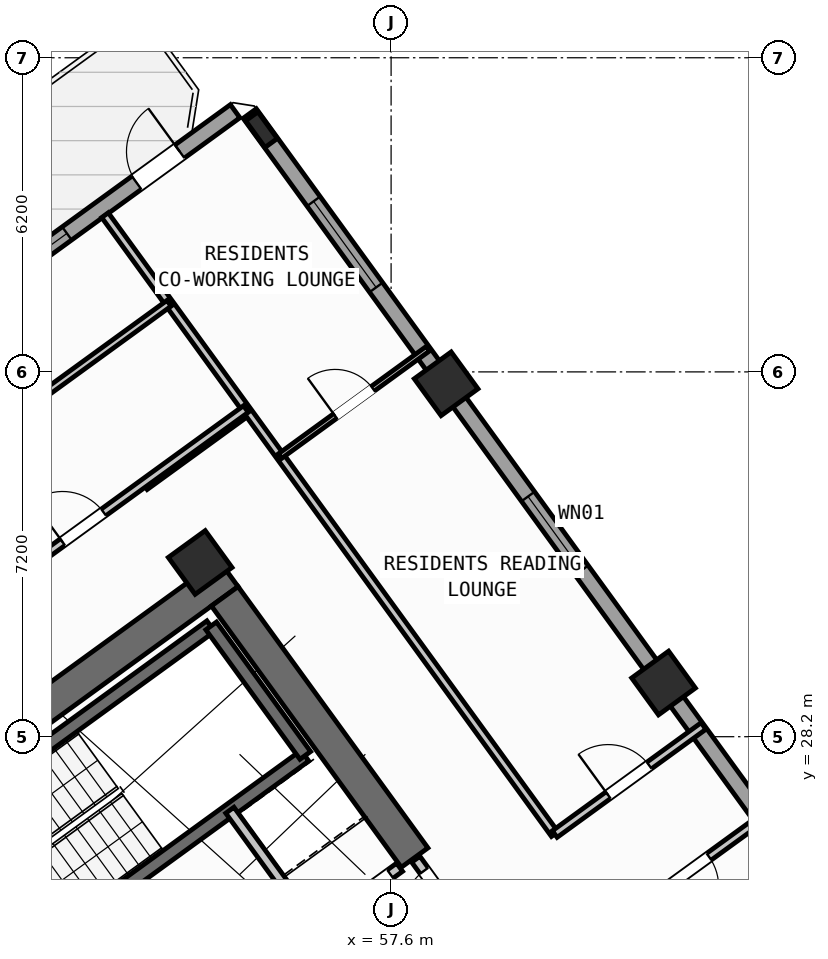
"""IFC4 building model, lengths in metres.
Left out: names, types, materials, properties, quantities, classifications, styles, units other than length and angle.
Written with IfcOpenShell. Run it as: python <this file> out.ifc"""

import sys

from ifc_helpers import new_model, si_unit, direction, frame, frame_2d, origin, origin_2d, place, context, subcontext, project, spatial, rectangle, hollow_rectangle, i_section, extrude, source, transform, mapped, element, fill, save


model = new_model("IFC4")
c1 = context("Model", 3, precision=1e-05, world=origin(), true_north=direction((0.0, 1.0)))
c2 = subcontext(c1, "Body", "Model", "MODEL_VIEW")
j1 = project(units=[si_unit("LENGTHUNIT", "METRE"), si_unit("PLANEANGLEUNIT", "RADIAN")], contexts=[c1])
p1 = place(None, origin())
s1 = spatial("IfcSite", under=j1, at=p1, CompositionType="ELEMENT")
p2 = place(p1, origin())
s2 = spatial("IfcBuilding", under=s1, at=p2, CompositionType="ELEMENT")
p3 = place(p2, frame((0.0, 0.0, 97.2)))
s3 = spatial("IfcBuildingStorey", under=s2, at=p3, CompositionType="ELEMENT", Elevation=97.2)
p4 = place(p3, frame((44.325, 24.113, 0.0), z_axis=(0.0, 0.0, 1.0), x_axis=(0.809012664862, 0.58779121131, 0.0)))
e1 = element("IfcWall", 1, at=p4, inside=s3, PredefinedType="SHEAR", context=c2, shape_type="SweptSolid", body=[
    extrude(rectangle(XDim=12.44, YDim=0.65, at=frame_2d((6.22, 0.0))), origin(), (0.0, 0.0, 1.0), 3.32),
])
p5 = place(p3, frame((58.064, 25.813, 0.0), z_axis=(0.0, 0.0, 1.0), x_axis=(-0.58777996584, 0.809020835181, 0.0)))
e2 = element("IfcWall", 2, at=p5, inside=s3, PredefinedType="SHEAR", context=c2, shape_type="SweptSolid", body=[
    extrude(rectangle(XDim=6.375, YDim=0.65, at=frame_2d((3.188, 0.0))), origin(), (0.0, 0.0, 1.0), 3.32),
])
m1 = source(origin(), c2, "Body", "SweptSolid", [
    extrude(hollow_rectangle(XDim=0.9, YDim=0.9, WallThickness=0.036, at=origin_2d()), origin(), (0.0, 0.0, 1.0), 3.6),
])
for number, where, z_axis, x_axis in (
    (3, (53.832, 31.638, 0.0), (0.0, 0.0, 1.0), (0.809, 0.588, 0.0)),
    (4, (62.977, 29.259, 0.0), (0.0, 0.0, 1.0), (0.809, 0.588, 0.0)),
    (5, (58.686, 35.165, 0.0), (0.0, 0.0, 1.0), (0.809, 0.588, 0.0)),
):
    element("IfcColumn", number, at=place(p3, frame(where, z_axis=z_axis, x_axis=x_axis)), inside=s3, PredefinedType="COLUMN", context=c2, shape_type="MappedRepresentation", body=[
        mapped(m1, transform((0.0, 0.0, 0.0), scale=1.0)),
    ])
m2 = source(origin(), c2, "Body", "SweptSolid", [
    extrude(i_section(OverallWidth=0.3, OverallDepth=0.65, WebThickness=0.016, FlangeThickness=0.031, at=origin_2d()), origin(), (0.0, 0.0, 1.0), 3.6),
])
p6 = place(p3, frame((55.042, 40.181, 0.0), z_axis=(0.0, 0.0, 1.0), x_axis=(0.809016994375, 0.587785252292, 0.0)))
e6 = element("IfcColumn", 6, at=p6, inside=s3, PredefinedType="COLUMN", context=c2, shape_type="MappedRepresentation", body=[
    mapped(m2, transform((0.0, 0.0, 0.0), scale=1.0)),
])
p7 = place(p3, frame((42.207, 31.597, 0.0), z_axis=(0.0, 0.0, 1.0), x_axis=(0.809020333377, 0.587780656523, 0.0)))
e7 = element("IfcWall", 7, at=p7, inside=s3, PredefinedType="STANDARD", context=c2, shape_type="SweptSolid", body=[
    extrude(rectangle(XDim=15.223, YDim=0.32, at=frame_2d((7.611, 0.0))), origin(), (0.0, 0.0, 1.0), 3.32),
])
p8 = place(p7, frame((12.82, 0.0, 0.0)))
e8 = element("IfcOpeningElement", 8, at=p8, cuts=e7, PredefinedType="OPENING", context=c2, shape_type="SweptSolid", body=[
    extrude(rectangle(XDim=1.05, YDim=2.15, at=frame_2d((0.525, 1.075))), frame((0.0, 0.17, 0.0), z_axis=(0.0, -1.0, 0.0), x_axis=(1.0, 0.0, 0.0)), (0.0, 0.0, 1.0), 0.34),
])
p9 = place(p7, frame((1.52, 0.0, 0.8)))
e9 = element("IfcOpeningElement", 9, at=p9, cuts=e7, PredefinedType="OPENING", context=c2, shape_type="SweptSolid", body=[
    extrude(rectangle(XDim=2.1, YDim=1.55, at=frame_2d((1.05, 0.775))), frame((0.0, 0.17, 0.0), z_axis=(0.0, -1.0, 0.0), x_axis=(1.0, 0.0, 0.0)), (0.0, 0.0, 1.0), 0.34),
])
p10 = place(p7, frame((5.76, 0.0, 0.8)))
e10 = element("IfcOpeningElement", 10, at=p10, cuts=e7, PredefinedType="OPENING", context=c2, shape_type="SweptSolid", body=[
    extrude(rectangle(XDim=2.1, YDim=1.55, at=frame_2d((1.05, 0.775))), frame((0.0, 0.17, 0.0), z_axis=(0.0, -1.0, 0.0), x_axis=(1.0, 0.0, 0.0)), (0.0, 0.0, 1.0), 0.34),
])
p11 = place(p7, frame((10.219, 0.0, 1.0)))
e11 = element("IfcOpeningElement", 11, at=p11, cuts=e7, PredefinedType="OPENING", context=c2, shape_type="SweptSolid", body=[
    extrude(rectangle(XDim=0.9, YDim=1.25, at=frame_2d((0.45, 0.625))), frame((0.0, 0.17, 0.0), z_axis=(0.0, -1.0, 0.0), x_axis=(1.0, 0.0, 0.0)), (0.0, 0.0, 1.0), 0.34),
])
p12 = place(p3, frame((54.81, 40.5, 0.0), z_axis=(0.0, 0.0, 1.0), x_axis=(0.587783625747, -0.809018176127, 0.0)))
e12 = element("IfcWall", 12, at=p12, inside=s3, PredefinedType="STANDARD", context=c2, shape_type="SweptSolid", body=[
    extrude(rectangle(XDim=21.587, YDim=0.32, at=frame_2d((10.794, 0.0))), origin(), (0.0, 0.0, 1.0), 2.745),
])
p13 = place(p12, frame((2.143, 0.0, 0.8)))
e13 = element("IfcOpeningElement", 13, at=p13, cuts=e12, PredefinedType="OPENING", context=c2, shape_type="SweptSolid", body=[
    extrude(rectangle(XDim=2.1, YDim=1.55, at=frame_2d((1.05, 0.775))), frame((0.0, 0.17, 0.0), z_axis=(0.0, -1.0, 0.0), x_axis=(1.0, 0.0, 0.0)), (0.0, 0.0, 1.0), 0.34),
])
p14 = place(p12, frame((9.344, 0.0, 0.85)))
e14 = element("IfcOpeningElement", 14, at=p14, cuts=e12, PredefinedType="OPENING", context=c2, shape_type="SweptSolid", body=[
    extrude(rectangle(XDim=1.8, YDim=1.5, at=frame_2d((0.9, 0.75))), frame((0.0, 0.17, 0.0), z_axis=(0.0, -1.0, 0.0), x_axis=(1.0, 0.0, 0.0)), (0.0, 0.0, 1.0), 0.34),
])
p15 = place(p12, frame((18.309, 0.0, 0.85)))
e15 = element("IfcOpeningElement", 15, at=p15, cuts=e12, PredefinedType="OPENING", context=c2, shape_type="SweptSolid", body=[
    extrude(rectangle(XDim=1.5, YDim=1.5, at=frame_2d((0.75, 0.75))), frame((0.0, 0.17, 0.0), z_axis=(0.0, -1.0, 0.0), x_axis=(1.0, 0.0, 0.0)), (0.0, 0.0, 1.0), 0.34),
])
p16 = place(p3, frame((48.006, 25.996, 0.0), z_axis=(0.0, 0.0, 1.0), x_axis=(0.80901903764, 0.587782439969, 0.0)))
e16 = element("IfcWall", 16, at=p16, inside=s3, PredefinedType="SHEAR", context=c2, shape_type="SweptSolid", body=[
    extrude(rectangle(XDim=7.46, YDim=0.26, at=frame_2d((3.73, 0.0))), origin(), (0.0, 0.0, 1.0), 3.32),
])
p17 = place(p3, frame((49.863, 23.44, 0.0), z_axis=(0.0, 0.0, 1.0), x_axis=(0.809003474932, 0.587803859759, 0.0)))
e17 = element("IfcWall", 17, at=p17, inside=s3, PredefinedType="SHEAR", context=c2, shape_type="SweptSolid", body=[
    extrude(rectangle(XDim=7.46, YDim=0.26, at=frame_2d((3.73, 0.0))), origin(), (0.0, 0.0, 1.0), 3.32),
])
p18 = place(p17, frame((0.36, 0.0, 0.0)))
e18 = element("IfcOpeningElement", 18, at=p18, cuts=e17, PredefinedType="OPENING", context=c2, shape_type="SweptSolid", body=[
    extrude(rectangle(XDim=0.86, YDim=2.05, at=frame_2d((0.43, 1.025))), frame((0.0, 0.14, 0.0), z_axis=(0.0, -1.0, 0.0), x_axis=(1.0, 0.0, 0.0)), (0.0, 0.0, 1.0), 0.28),
])
p19 = place(p3, frame((55.906, 27.831, 0.0), z_axis=(0.0, 0.0, 1.0), x_axis=(-0.587804123638, 0.809003283204, 0.0)))
e19 = element("IfcWall", 19, at=p19, inside=s3, PredefinedType="SHEAR", context=c2, shape_type="SweptSolid", body=[
    extrude(rectangle(XDim=3.16, YDim=0.26, at=frame_2d((1.58, 0.0))), origin(), (0.0, 0.0, 1.0), 3.32),
])
p20 = place(p3, frame((56.111, 24.419, 0.0), z_axis=(0.0, 0.0, 1.0), x_axis=(-0.58777848983, 0.809021907548, 0.0)))
e20 = element("IfcWall", 20, at=p20, inside=s3, PredefinedType="STANDARD", context=c2, shape_type="SweptSolid", body=[
    extrude(rectangle(XDim=2.88, YDim=0.2, at=frame_2d((1.44, 0.0))), origin(), (0.0, 0.0, 1.0), 3.31),
])
p21 = place(p3, frame((53.425, 22.468, 0.0), z_axis=(0.0, 0.0, 1.0), x_axis=(0.80902705128, 0.587771409902, 0.0)))
e21 = element("IfcWall", 21, at=p21, inside=s3, PredefinedType="STANDARD", context=c2, shape_type="SweptSolid", body=[
    extrude(rectangle(XDim=5.368, YDim=0.2, at=frame_2d((2.684, 0.0))), origin(), (0.0, 0.0, 1.0), 3.31),
])
p22 = place(p21, frame((4.28, 0.0, 0.0)))
e22 = element("IfcOpeningElement", 22, at=p22, cuts=e21, PredefinedType="OPENING", context=c2, shape_type="SweptSolid", body=[
    extrude(rectangle(XDim=0.86, YDim=2.05, at=frame_2d((0.43, 1.025))), frame((0.0, 0.11, 0.0), z_axis=(0.0, -1.0, 0.0), x_axis=(1.0, 0.0, 0.0)), (0.0, 0.0, 1.0), 0.22),
])
p23 = place(p21, frame((1.45, 0.0, 0.0)))
e23 = element("IfcOpeningElement", 23, at=p23, cuts=e21, PredefinedType="OPENING", context=c2, shape_type="SweptSolid", body=[
    extrude(rectangle(XDim=0.86, YDim=2.05, at=frame_2d((0.43, 1.025))), frame((0.0, 0.11, 0.0), z_axis=(0.0, -1.0, 0.0), x_axis=(1.0, 0.0, 0.0)), (0.0, 0.0, 1.0), 0.22),
])
p24 = place(p3, frame((59.827, 23.386, 0.0), z_axis=(0.0, 0.0, 1.0), x_axis=(-0.587803840107, 0.809003489211, 0.0)))
e24 = element("IfcWall", 24, at=p24, inside=s3, PredefinedType="STANDARD", context=c2, shape_type="SweptSolid", body=[
    extrude(rectangle(XDim=2.96, YDim=0.2, at=frame_2d((1.48, 0.0))), origin(), (0.0, 0.0, 1.0), 3.31),
])
p25 = place(p24, frame((1.68, 0.0, 0.0)))
e25 = element("IfcOpeningElement", 25, at=p25, cuts=e24, PredefinedType="OPENING", context=c2, shape_type="SweptSolid", body=[
    extrude(rectangle(XDim=1.0, YDim=2.1, at=frame_2d((0.5, 1.05))), frame((0.0, 0.11, 0.0), z_axis=(0.0, -1.0, 0.0), x_axis=(1.0, 0.0, 0.0)), (0.0, 0.0, 1.0), 0.22),
])
p26 = place(p3, frame((52.739, 33.143, 0.0), z_axis=(0.0, 0.0, 1.0), x_axis=(0.809000999347, 0.58780726693, 0.0)))
e26 = element("IfcWall", 26, at=p26, inside=s3, PredefinedType="PARTITIONING", context=c2, shape_type="SweptSolid", body=[
    extrude(rectangle(XDim=2.51, YDim=0.16, at=frame_2d((1.255, 0.0))), origin(), (0.0, 0.0, 1.0), 3.31),
])
p27 = place(p3, frame((60.829, 26.278, 0.0), z_axis=(0.0, 0.0, 1.0), x_axis=(-0.587777474174, 0.809022645451, 0.0)))
e27 = element("IfcWall", 27, at=p27, inside=s3, PredefinedType="PARTITIONING", context=c2, shape_type="SweptSolid", body=[
    extrude(rectangle(XDim=15.1, YDim=0.16, at=frame_2d((7.55, 0.0))), origin(), (0.0, 0.0, 1.0), 3.31),
])
p28 = place(p3, frame((62.093, 24.538, 0.0), z_axis=(0.0, 0.0, 1.0), x_axis=(0.809035546126, 0.58775971715, 0.0)))
e28 = element("IfcWall", 28, at=p28, inside=s3, PredefinedType="PARTITIONING", context=c2, shape_type="SweptSolid", body=[
    extrude(rectangle(XDim=3.63, YDim=0.16, at=frame_2d((1.815, 0.0))), origin(), (0.0, 0.0, 1.0), 3.31),
])
p29 = place(p28, frame((1.2, 0.0, 0.0)))
e29 = element("IfcOpeningElement", 29, at=p29, cuts=e28, PredefinedType="OPENING", context=c2, shape_type="SweptSolid", body=[
    extrude(rectangle(XDim=1.0, YDim=2.1, at=frame_2d((0.5, 1.05))), frame((0.0, 0.09, 0.0), z_axis=(0.0, -1.0, 0.0), x_axis=(1.0, 0.0, 0.0)), (0.0, 0.0, 1.0), 0.18),
])
p30 = place(p3, frame((60.829, 26.278, 0.0), z_axis=(0.0, 0.0, 1.0), x_axis=(0.809003564202, 0.587803736896, 0.0)))
e30 = element("IfcWall", 30, at=p30, inside=s3, PredefinedType="PARTITIONING", context=c2, shape_type="SweptSolid", body=[
    extrude(rectangle(XDim=3.63, YDim=0.16, at=frame_2d((1.815, 0.0))), origin(), (0.0, 0.0, 1.0), 3.31),
])
p31 = place(p30, frame((1.305, 0.0, 0.0)))
e31 = element("IfcOpeningElement", 31, at=p31, cuts=e30, PredefinedType="OPENING", context=c2, shape_type="SweptSolid", body=[
    extrude(rectangle(XDim=1.0, YDim=2.1, at=frame_2d((0.5, 1.05))), frame((0.0, 0.09, 0.0), z_axis=(0.0, -1.0, 0.0), x_axis=(1.0, 0.0, 0.0)), (0.0, 0.0, 1.0), 0.18),
])
p32 = place(p3, frame((55.409, 33.738, 0.0), z_axis=(0.0, 0.0, 1.0), x_axis=(0.809005039917, 0.58780170584, 0.0)))
e32 = element("IfcWall", 32, at=p32, inside=s3, PredefinedType="PARTITIONING", context=c2, shape_type="SweptSolid", body=[
    extrude(rectangle(XDim=3.61, YDim=0.11, at=frame_2d((1.805, 0.0))), origin(), (0.0, 0.0, 1.0), 3.31),
])
p33 = place(p32, frame((1.345, 0.0, 0.0)))
e33 = element("IfcOpeningElement", 33, at=p33, cuts=e32, PredefinedType="OPENING", context=c2, shape_type="SweptSolid", body=[
    extrude(rectangle(XDim=0.92, YDim=2.08, at=frame_2d((0.46, 1.04))), frame((0.0, 0.065, 0.0), z_axis=(0.0, -1.0, 0.0), x_axis=(1.0, 0.0, 0.0)), (0.0, 0.0, 1.0), 0.13),
])
p34 = place(p3, frame((42.866, 26.044, 0.0), z_axis=(0.0, 0.0, 1.0), x_axis=(0.809020254154, 0.587780765566, 0.0)))
e34 = element("IfcWall", 34, at=p34, inside=s3, PredefinedType="PARTITIONING", context=c2, shape_type="SweptSolid", body=[
    extrude(rectangle(XDim=14.67, YDim=0.16, at=frame_2d((7.335, 0.0))), origin(), (0.0, 0.0, 1.0), 3.31),
])
p35 = place(p34, frame((10.2, 0.0, 0.0)))
e35 = element("IfcOpeningElement", 35, at=p35, cuts=e34, PredefinedType="OPENING", context=c2, shape_type="SweptSolid", body=[
    extrude(rectangle(XDim=1.0, YDim=2.1, at=frame_2d((0.5, 1.05))), frame((0.0, 0.09, 0.0), z_axis=(0.0, -1.0, 0.0), x_axis=(1.0, 0.0, 0.0)), (0.0, 0.0, 1.0), 0.18),
])
p36 = place(p3, frame((42.377, 28.878, 0.0), z_axis=(0.0, 0.0, 1.0), x_axis=(0.809020411523, 0.587780548963, 0.0)))
e36 = element("IfcWall", 36, at=p36, inside=s3, PredefinedType="PLUMBINGWALL", context=c2, shape_type="SweptSolid", body=[
    extrude(rectangle(XDim=13.4, YDim=0.14, at=frame_2d((6.7, 0.0))), origin(), (0.0, 0.0, 1.0), 3.31),
])
p37 = place(p36, frame((8.94, 0.0, 0.0)))
e37 = element("IfcOpeningElement", 37, at=p37, cuts=e36, PredefinedType="OPENING", context=c2, shape_type="SweptSolid", body=[
    extrude(rectangle(XDim=0.92, YDim=2.08, at=frame_2d((0.46, 1.04))), frame((0.0, 0.08, 0.0), z_axis=(0.0, -1.0, 0.0), x_axis=(1.0, 0.0, 0.0)), (0.0, 0.0, 1.0), 0.16),
])
m3 = source(origin(), c2, "Body", "SweptSolid", [
    extrude(rectangle(XDim=1.05, YDim=2.15, at=frame_2d((0.525, 1.075))), frame((0.0, 0.025, 0.0), z_axis=(0.0, -1.0, 0.0), x_axis=(1.0, 0.0, 0.0)), (0.0, 0.0, 1.0), 0.05),
])
p38 = place(p8, origin())
e38 = element("IfcDoor", 38, at=p38, inside=s3, OperationType="SINGLE_SWING_RIGHT", PredefinedType="DOOR", context=c2, shape_type="MappedRepresentation", body=[
    mapped(m3, transform((0.0, 0.0, 0.0), scale=1.0)),
])
fill(e8, e38)
m4 = source(origin(), c2, "Body", "SweptSolid", [
    extrude(rectangle(XDim=0.9, YDim=1.25, at=frame_2d((0.45, 0.625))), frame((0.0, 0.03, 0.0), z_axis=(0.0, -1.0, 0.0), x_axis=(1.0, 0.0, 0.0)), (0.0, 0.0, 1.0), 0.06),
])
p39 = place(p11, origin())
e39 = element("IfcWindow", 39, at=p39, inside=s3, PartitioningType="SINGLE_PANEL", PredefinedType="WINDOW", context=c2, shape_type="MappedRepresentation", body=[
    mapped(m4, transform((0.0, 0.0, 0.0), scale=1.0)),
])
fill(e11, e39)
m5 = source(origin(), c2, "Body", "SweptSolid", [
    extrude(rectangle(XDim=2.1, YDim=1.55, at=frame_2d((1.05, 0.775))), frame((0.0, 0.03, 0.0), z_axis=(0.0, -1.0, 0.0), x_axis=(1.0, 0.0, 0.0)), (0.0, 0.0, 1.0), 0.06),
])
p40 = place(p13, origin())
e40 = element("IfcWindow", 40, at=p40, inside=s3, PartitioningType="SINGLE_PANEL", PredefinedType="WINDOW", context=c2, shape_type="MappedRepresentation", body=[
    mapped(m5, transform((0.0, 0.0, 0.0), scale=1.0)),
])
fill(e13, e40)
m6 = source(origin(), c2, "Body", "SweptSolid", [
    extrude(rectangle(XDim=1.8, YDim=1.5, at=frame_2d((0.9, 0.75))), frame((0.0, 0.03, 0.0), z_axis=(0.0, -1.0, 0.0), x_axis=(1.0, 0.0, 0.0)), (0.0, 0.0, 1.0), 0.06),
])
p41 = place(p14, origin())
e41 = element("IfcWindow", 41, at=p41, inside=s3, PartitioningType="SINGLE_PANEL", PredefinedType="WINDOW", context=c2, shape_type="MappedRepresentation", body=[
    mapped(m6, transform((0.0, 0.0, 0.0), scale=1.0)),
])
fill(e14, e41)
m7 = source(origin(), c2, "Body", "SweptSolid", [
    extrude(rectangle(XDim=0.86, YDim=2.05, at=frame_2d((0.43, 1.025))), frame((0.0, 0.025, 0.0), z_axis=(0.0, -1.0, 0.0), x_axis=(1.0, 0.0, 0.0)), (0.0, 0.0, 1.0), 0.05),
])
p42 = place(p22, frame((0.86, 0.0, 0.0), z_axis=(0.0, 0.0, 1.0), x_axis=(-1.0, 0.0, 0.0)))
e42 = element("IfcDoor", 42, at=p42, inside=s3, OperationType="SINGLE_SWING_RIGHT", PredefinedType="DOOR", context=c2, shape_type="MappedRepresentation", body=[
    mapped(m7, transform((0.0, 0.0, 0.0), scale=1.0)),
])
fill(e22, e42)
m8 = source(origin(), c2, "Body", "SweptSolid", [
    extrude(rectangle(XDim=1.0, YDim=2.1, at=frame_2d((0.5, 1.05))), frame((0.0, 0.025, 0.0), z_axis=(0.0, -1.0, 0.0), x_axis=(1.0, 0.0, 0.0)), (0.0, 0.0, 1.0), 0.05),
])
p43 = place(p25, origin())
e43 = element("IfcDoor", 43, at=p43, inside=s3, OperationType="SINGLE_SWING_LEFT", PredefinedType="DOOR", context=c2, shape_type="MappedRepresentation", body=[
    mapped(m8, transform((0.0, 0.0, 0.0), scale=1.0)),
])
fill(e25, e43)
p44 = place(p31, origin())
e44 = element("IfcDoor", 44, at=p44, inside=s3, OperationType="SINGLE_SWING_LEFT", PredefinedType="DOOR", context=c2, shape_type="MappedRepresentation", body=[
    mapped(m8, transform((0.0, 0.0, 0.0), scale=1.0)),
])
fill(e31, e44)
m9 = source(origin(), c2, "Body", "SweptSolid", [
    extrude(rectangle(XDim=0.92, YDim=2.08, at=frame_2d((0.46, 1.04))), frame((0.0, 0.025, 0.0), z_axis=(0.0, -1.0, 0.0), x_axis=(1.0, 0.0, 0.0)), (0.0, 0.0, 1.0), 0.05),
])
p45 = place(p33, origin())
e45 = element("IfcDoor", 45, at=p45, inside=s3, OperationType="SINGLE_SWING_LEFT", PredefinedType="DOOR", context=c2, shape_type="MappedRepresentation", body=[
    mapped(m9, transform((0.0, 0.0, 0.0), scale=1.0)),
])
fill(e33, e45)
p46 = place(p29, frame((1.0, 0.0, 0.0), z_axis=(0.0, 0.0, 1.0), x_axis=(-1.0, 0.0, 0.0)))
e46 = element("IfcDoor", 46, at=p46, inside=s3, OperationType="SINGLE_SWING_RIGHT", PredefinedType="DOOR", context=c2, shape_type="MappedRepresentation", body=[
    mapped(m8, transform((0.0, 0.0, 0.0), scale=1.0)),
])
fill(e29, e46)
p47 = place(p35, origin())
e47 = element("IfcDoor", 47, at=p47, inside=s3, OperationType="SINGLE_SWING_LEFT", PredefinedType="DOOR", context=c2, shape_type="MappedRepresentation", body=[
    mapped(m8, transform((0.0, 0.0, 0.0), scale=1.0)),
])
fill(e35, e47)
save(model, sys.argv[1])
